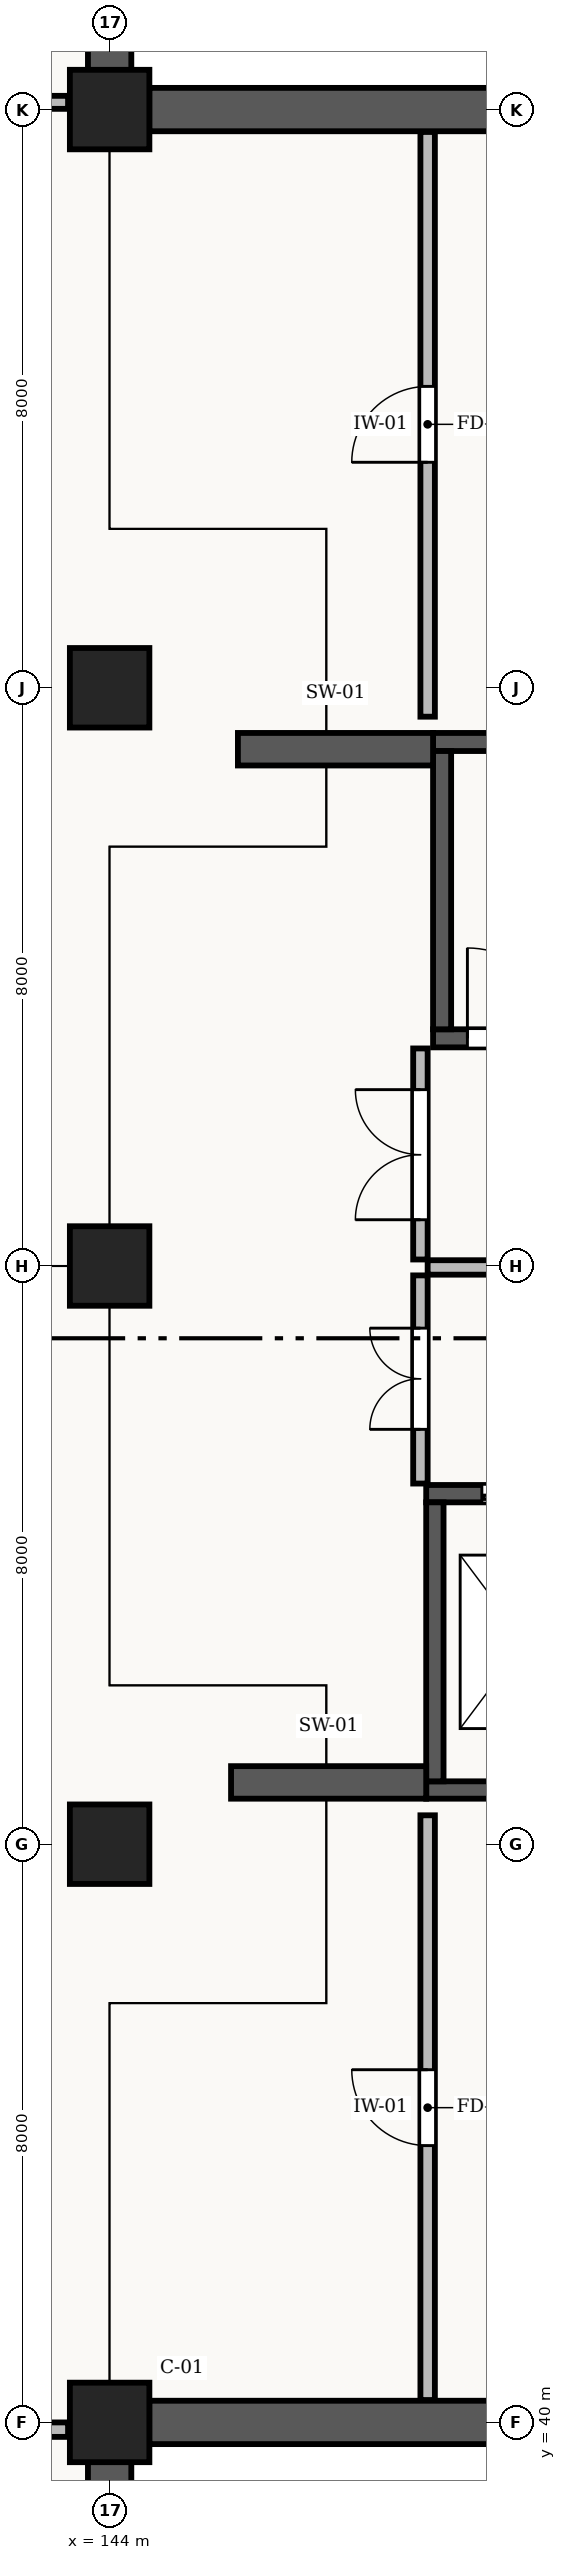
"""IFC4 building model, lengths in metres.
Left out: names, types, materials, properties, quantities, classifications, styles, units other than length and angle.
Written with IfcOpenShell. Run it as: python <this file> out.ifc"""

import sys

from ifc_helpers import new_model, si_unit, direction, frame, frame_2d, origin, origin_2d, place, context, subcontext, project, spatial, rectangle, extrude, element, fill, save


model = new_model("IFC4")
c1 = context("Model", 3, precision=1e-05, world=origin(), true_north=direction((0.0, 1.0)))
c2 = subcontext(c1, "Body", "Model", "MODEL_VIEW")
j1 = project(units=[si_unit("LENGTHUNIT", "METRE"), si_unit("PLANEANGLEUNIT", "RADIAN")], contexts=[c1])
p1 = place(None, origin())
s1 = spatial("IfcSite", under=j1, at=p1, CompositionType="ELEMENT")
p2 = place(p1, origin())
s2 = spatial("IfcBuilding", under=s1, at=p2, CompositionType="ELEMENT")
p3 = place(p2, frame((0.0, 0.0, -12.0)))
s3 = spatial("IfcBuildingStorey", under=s2, at=p3, CompositionType="ELEMENT", Elevation=-12.0)
for number, where, z_axis, x_axis in (
    (1, (144.0, 40.0, 0.0), (0.0, 0.0, 1.0), (1.0, 0.0, 0.0)),
    (2, (144.0, 48.0, 0.0), (0.0, 0.0, 1.0), (1.0, 0.0, 0.0)),
    (3, (144.0, 56.0, 0.0), (0.0, 0.0, 1.0), (1.0, 0.0, 0.0)),
    (4, (144.0, 64.0, 0.0), (0.0, 0.0, 1.0), (1.0, 0.0, 0.0)),
    (5, (144.0, 72.0, 0.0), (0.0, 0.0, 1.0), (1.0, 0.0, 0.0)),
):
    element("IfcColumn", number, at=place(p3, frame(where, z_axis=z_axis, x_axis=x_axis)), inside=s3, PredefinedType="COLUMN", context=c2, shape_type="SweptSolid", body=[
        extrude(rectangle(XDim=1.1, YDim=1.1, at=origin_2d()), origin(), (0.0, 0.0, 1.0), 6.0),
    ])
p4 = place(p3, frame((144.0, 79.452, 0.0), z_axis=(0.0, 0.0, 1.0), x_axis=(0.0, -1.0, 0.0)))
e6 = element("IfcWall", 6, at=p4, inside=s3, PredefinedType="STANDARD", context=c2, shape_type="SweptSolid", body=[
    extrude(rectangle(XDim=6.904, YDim=0.6, at=frame_2d((3.452, 0.0))), origin(), (0.0, 0.0, 1.0), 5.54),
])
for number, where, z_axis, x_axis in (
    (7, (144.548, 72.0, 0.0), (0.0, 0.0, 1.0), (1.0, 0.0, 0.0)),
    (8, (152.452, 40.0, 0.0), (0.0, 0.0, 1.0), (-1.0, 0.0, 0.0)),
):
    element("IfcWall", number, at=place(p3, frame(where, z_axis=z_axis, x_axis=x_axis)), inside=s3, PredefinedType="STANDARD", context=c2, shape_type="SweptSolid", body=[
        extrude(rectangle(XDim=7.904, YDim=0.6, at=frame_2d((3.952, 0.0))), origin(), (0.0, 0.0, 1.0), 5.54),
    ])
p5 = place(p3, frame((144.0, 39.452, 0.0), z_axis=(0.0, 0.0, 1.0), x_axis=(0.0, -1.0, 0.0)))
e9 = element("IfcWall", 9, at=p5, inside=s3, PredefinedType="STANDARD", context=c2, shape_type="SweptSolid", body=[
    extrude(rectangle(XDim=6.904, YDim=0.6, at=frame_2d((3.452, 0.0))), origin(), (0.0, 0.0, 1.0), 5.54),
])
p6 = place(p3, frame((148.475, 59.15, 0.0), z_axis=(0.0, 0.0, 1.0), x_axis=(1.0, 0.0, 0.0)))
e10 = element("IfcWall", 10, at=p6, inside=s3, PredefinedType="SHEAR", context=c2, shape_type="SweptSolid", body=[
    extrude(rectangle(XDim=9.65, YDim=0.25, at=frame_2d((4.825, 0.0))), origin(), (0.0, 0.0, 1.0), 5.53),
])
p7 = place(p6, frame((0.475, 0.0, 0.0)))
e11 = element("IfcOpeningElement", 11, at=p7, cuts=e10, PredefinedType="OPENING", context=c2, shape_type="SweptSolid", body=[
    extrude(rectangle(XDim=1.25, YDim=2.15, at=frame_2d((0.625, 1.075))), frame((0.0, 0.137, 0.0), z_axis=(0.0, -1.0, 0.0), x_axis=(1.0, 0.0, 0.0)), (0.0, 0.0, 1.0), 0.274),
])
p8 = place(p3, frame((158.125, 63.25, 0.0), z_axis=(0.0, 0.0, 1.0), x_axis=(-1.0, 0.0, 0.0)))
e12 = element("IfcWall", 12, at=p8, inside=s3, PredefinedType="SHEAR", context=c2, shape_type="SweptSolid", body=[
    extrude(rectangle(XDim=9.65, YDim=0.25, at=frame_2d((4.825, 0.0))), origin(), (0.0, 0.0, 1.0), 5.53),
])
p9 = place(p3, frame((148.6, 63.125, 0.0), z_axis=(0.0, 0.0, 1.0), x_axis=(0.0, -1.0, 0.0)))
e13 = element("IfcWall", 13, at=p9, inside=s3, PredefinedType="SHEAR", context=c2, shape_type="SweptSolid", body=[
    extrude(rectangle(XDim=3.85, YDim=0.25, at=frame_2d((1.925, 0.0))), origin(), (0.0, 0.0, 1.0), 5.53),
])
p10 = place(p3, frame((148.38, 48.75, 0.0), z_axis=(0.0, 0.0, 1.0), x_axis=(1.0, 0.0, 0.0)))
e14 = element("IfcWall", 14, at=p10, inside=s3, PredefinedType="SHEAR", context=c2, shape_type="SweptSolid", body=[
    extrude(rectangle(XDim=2.74, YDim=0.24, at=frame_2d((1.37, 0.0))), origin(), (0.0, 0.0, 1.0), 5.53),
])
p11 = place(p3, frame((151.12, 52.85, 0.0), z_axis=(0.0, 0.0, 1.0), x_axis=(-1.0, 0.0, 0.0)))
e15 = element("IfcWall", 15, at=p11, inside=s3, PredefinedType="SHEAR", context=c2, shape_type="SweptSolid", body=[
    extrude(rectangle(XDim=2.74, YDim=0.24, at=frame_2d((1.37, 0.0))), origin(), (0.0, 0.0, 1.0), 5.53),
])
p12 = place(p11, frame((0.77, 0.0, 0.0)))
e16 = element("IfcOpeningElement", 16, at=p12, cuts=e15, PredefinedType="OPENING", context=c2, shape_type="SweptSolid", body=[
    extrude(rectangle(XDim=1.2, YDim=2.2, at=frame_2d((0.6, 1.1))), frame((0.0, 0.132, 0.0), z_axis=(0.0, -1.0, 0.0), x_axis=(1.0, 0.0, 0.0)), (0.0, 0.0, 1.0), 0.264),
])
p13 = place(p3, frame((148.5, 52.73, 0.0), z_axis=(0.0, 0.0, 1.0), x_axis=(0.0, -1.0, 0.0)))
e17 = element("IfcWall", 17, at=p13, inside=s3, PredefinedType="SHEAR", context=c2, shape_type="SweptSolid", body=[
    extrude(rectangle(XDim=3.86, YDim=0.24, at=frame_2d((1.93, 0.0))), origin(), (0.0, 0.0, 1.0), 5.53),
])
p14 = place(p3, frame((145.68, 48.855, 0.0), z_axis=(0.0, 0.0, 1.0), x_axis=(1.0, 0.0, 0.0)))
e18 = element("IfcWall", 18, at=p14, inside=s3, PredefinedType="SHEAR", context=c2, shape_type="SweptSolid", body=[
    extrude(rectangle(XDim=2.7, YDim=0.45, at=frame_2d((1.35, 0.0))), origin(), (0.0, 0.0, 1.0), 4.58),
])
p15 = place(p3, frame((145.775, 63.15, 0.0), z_axis=(0.0, 0.0, 1.0), x_axis=(1.0, 0.0, 0.0)))
e19 = element("IfcWall", 19, at=p15, inside=s3, PredefinedType="SHEAR", context=c2, shape_type="SweptSolid", body=[
    extrude(rectangle(XDim=2.7, YDim=0.45, at=frame_2d((1.35, 0.0))), origin(), (0.0, 0.0, 1.0), 4.58),
])
p16 = place(p3, frame((148.4, 55.98, 0.0), z_axis=(0.0, 0.0, 1.0), x_axis=(1.0, 0.0, 0.0)))
e20 = element("IfcWall", 20, at=p16, inside=s3, PredefinedType="STANDARD", context=c2, shape_type="SweptSolid", body=[
    extrude(rectangle(XDim=9.5, YDim=0.2, at=frame_2d((4.75, 0.0))), origin(), (0.0, 0.0, 1.0), 4.61),
])
p17 = place(p16, frame((5.2, 0.0, 0.0)))
e21 = element("IfcOpeningElement", 21, at=p17, cuts=e20, PredefinedType="OPENING", context=c2, shape_type="SweptSolid", body=[
    extrude(rectangle(XDim=1.4, YDim=2.2, at=frame_2d((0.7, 1.1))), frame((0.0, 0.112, 0.0), z_axis=(0.0, -1.0, 0.0), x_axis=(1.0, 0.0, 0.0)), (0.0, 0.0, 1.0), 0.224),
])
p18 = place(p3, frame((148.3, 52.99, 0.0), z_axis=(0.0, 0.0, 1.0), x_axis=(0.0, 1.0, 0.0)))
e22 = element("IfcWall", 22, at=p18, inside=s3, PredefinedType="STANDARD", context=c2, shape_type="SweptSolid", body=[
    extrude(rectangle(XDim=2.88, YDim=0.2, at=frame_2d((1.44, 0.0))), origin(), (0.0, 0.0, 1.0), 5.53),
])
p19 = place(p18, frame((0.75, 0.0, 0.0)))
e23 = element("IfcOpeningElement", 23, at=p19, cuts=e22, PredefinedType="OPENING", context=c2, shape_type="SweptSolid", body=[
    extrude(rectangle(XDim=1.4, YDim=2.2, at=frame_2d((0.7, 1.1))), frame((0.0, 0.112, 0.0), z_axis=(0.0, -1.0, 0.0), x_axis=(1.0, 0.0, 0.0)), (0.0, 0.0, 1.0), 0.224),
])
p20 = place(p3, frame((148.3, 56.09, 0.0), z_axis=(0.0, 0.0, 1.0), x_axis=(0.0, 1.0, 0.0)))
e24 = element("IfcWall", 24, at=p20, inside=s3, PredefinedType="STANDARD", context=c2, shape_type="SweptSolid", body=[
    extrude(rectangle(XDim=2.92, YDim=0.2, at=frame_2d((1.46, 0.0))), origin(), (0.0, 0.0, 1.0), 5.53),
])
p21 = place(p20, frame((0.55, 0.0, 0.0)))
e25 = element("IfcOpeningElement", 25, at=p21, cuts=e24, PredefinedType="OPENING", context=c2, shape_type="SweptSolid", body=[
    extrude(rectangle(XDim=1.8, YDim=2.2, at=frame_2d((0.9, 1.1))), frame((0.0, 0.112, 0.0), z_axis=(0.0, -1.0, 0.0), x_axis=(1.0, 0.0, 0.0)), (0.0, 0.0, 1.0), 0.224),
])
p22 = place(p3, frame((135.55, 39.9, 0.0), z_axis=(0.0, 0.0, 1.0), x_axis=(1.0, 0.0, 0.0)))
e26 = element("IfcWall", 26, at=p22, inside=s3, PredefinedType="STANDARD", context=c2, shape_type="SweptSolid", body=[
    extrude(rectangle(XDim=7.875, YDim=0.2, at=frame_2d((3.938, 0.0))), origin(), (0.0, 0.0, 1.0), 4.61),
])
p23 = place(p3, frame((135.55, 72.1, 0.0), z_axis=(0.0, 0.0, 1.0), x_axis=(1.0, 0.0, 0.0)))
e27 = element("IfcWall", 27, at=p23, inside=s3, PredefinedType="STANDARD", context=c2, shape_type="SweptSolid", body=[
    extrude(rectangle(XDim=7.875, YDim=0.18, at=frame_2d((3.938, 0.0))), origin(), (0.0, 0.0, 1.0), 4.61),
])
p24 = place(p3, frame((148.4, 40.31, 0.0), z_axis=(0.0, 0.0, 1.0), x_axis=(0.0, 1.0, 0.0)))
e28 = element("IfcWall", 28, at=p24, inside=s3, PredefinedType="STANDARD", context=c2, shape_type="SweptSolid", body=[
    extrude(rectangle(XDim=8.09, YDim=0.2, at=frame_2d((4.045, 0.0))), origin(), (0.0, 0.0, 1.0), 5.53),
])
p25 = place(p24, frame((3.52, 0.0, 0.0)))
e29 = element("IfcOpeningElement", 29, at=p25, cuts=e28, PredefinedType="OPENING", context=c2, shape_type="SweptSolid", body=[
    extrude(rectangle(XDim=1.05, YDim=2.15, at=frame_2d((0.525, 1.075))), frame((0.0, 0.112, 0.0), z_axis=(0.0, -1.0, 0.0), x_axis=(1.0, 0.0, 0.0)), (0.0, 0.0, 1.0), 0.224),
])
p26 = place(p3, frame((148.4, 63.6, 0.0), z_axis=(0.0, 0.0, 1.0), x_axis=(0.0, 1.0, 0.0)))
e30 = element("IfcWall", 30, at=p26, inside=s3, PredefinedType="STANDARD", context=c2, shape_type="SweptSolid", body=[
    extrude(rectangle(XDim=8.09, YDim=0.2, at=frame_2d((4.045, 0.0))), origin(), (0.0, 0.0, 1.0), 5.53),
])
p27 = place(p26, frame((3.52, 0.0, 0.0)))
e31 = element("IfcOpeningElement", 31, at=p27, cuts=e30, PredefinedType="OPENING", context=c2, shape_type="SweptSolid", body=[
    extrude(rectangle(XDim=1.05, YDim=2.15, at=frame_2d((0.525, 1.075))), frame((0.0, 0.112, 0.0), z_axis=(0.0, -1.0, 0.0), x_axis=(1.0, 0.0, 0.0)), (0.0, 0.0, 1.0), 0.224),
])
p28 = place(p7, origin())
e32 = element("IfcDoor", 32, at=p28, inside=s3, OperationType="SINGLE_SWING_LEFT", PredefinedType="DOOR", context=c2, shape_type="SweptSolid", body=[
    extrude(rectangle(XDim=1.25, YDim=2.15, at=frame_2d((0.625, 1.075))), frame((0.0, 0.025, 0.0), z_axis=(0.0, -1.0, 0.0), x_axis=(1.0, 0.0, 0.0)), (0.0, 0.0, 1.0), 0.05),
])
fill(e11, e32)
p29 = place(p12, origin())
e33 = element("IfcDoor", 33, at=p29, inside=s3, OperationType="DOUBLE_DOOR_SLIDING", PredefinedType="DOOR", context=c2, shape_type="SweptSolid", body=[
    extrude(rectangle(XDim=1.2, YDim=2.2, at=frame_2d((0.6, 1.1))), frame((0.0, 0.025, 0.0), z_axis=(0.0, -1.0, 0.0), x_axis=(1.0, 0.0, 0.0)), (0.0, 0.0, 1.0), 0.05),
])
fill(e16, e33)
p30 = place(p19, origin())
e34 = element("IfcDoor", 34, at=p30, inside=s3, OperationType="DOUBLE_DOOR_SINGLE_SWING", PredefinedType="DOOR", context=c2, shape_type="SweptSolid", body=[
    extrude(rectangle(XDim=1.4, YDim=2.2, at=frame_2d((0.7, 1.1))), frame((0.0, 0.025, 0.0), z_axis=(0.0, -1.0, 0.0), x_axis=(1.0, 0.0, 0.0)), (0.0, 0.0, 1.0), 0.05),
])
fill(e23, e34)
p31 = place(p21, origin())
e35 = element("IfcDoor", 35, at=p31, inside=s3, OperationType="DOUBLE_DOOR_SINGLE_SWING", PredefinedType="DOOR", context=c2, shape_type="SweptSolid", body=[
    extrude(rectangle(XDim=1.8, YDim=2.2, at=frame_2d((0.9, 1.1))), frame((0.0, 0.025, 0.0), z_axis=(0.0, -1.0, 0.0), x_axis=(1.0, 0.0, 0.0)), (0.0, 0.0, 1.0), 0.05),
])
fill(e25, e35)
p32 = place(p25, origin())
e36 = element("IfcDoor", 36, at=p32, inside=s3, OperationType="SINGLE_SWING_RIGHT", PredefinedType="DOOR", context=c2, shape_type="SweptSolid", body=[
    extrude(rectangle(XDim=1.05, YDim=2.15, at=frame_2d((0.525, 1.075))), frame((0.0, 0.025, 0.0), z_axis=(0.0, -1.0, 0.0), x_axis=(1.0, 0.0, 0.0)), (0.0, 0.0, 1.0), 0.05),
])
fill(e29, e36)
p33 = place(p27, origin())
e37 = element("IfcDoor", 37, at=p33, inside=s3, OperationType="SINGLE_SWING_LEFT", PredefinedType="DOOR", context=c2, shape_type="SweptSolid", body=[
    extrude(rectangle(XDim=1.05, YDim=2.15, at=frame_2d((0.525, 1.075))), frame((0.0, 0.025, 0.0), z_axis=(0.0, -1.0, 0.0), x_axis=(1.0, 0.0, 0.0)), (0.0, 0.0, 1.0), 0.05),
])
fill(e31, e37)
save(model, sys.argv[1])
